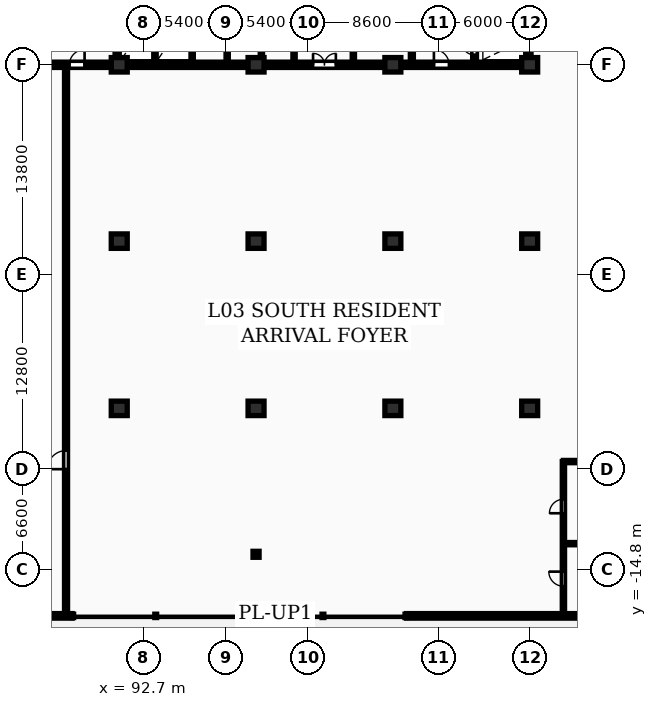
"""IFC4 building model, lengths in metres.
Left out: names, types, materials, properties, quantities, classifications, styles, units other than length and angle.
Written with IfcOpenShell. Run it as: python <this file> out.ifc"""

import sys

from ifc_helpers import new_model, si_unit, direction, frame, frame_2d, origin, origin_2d, place, context, subcontext, project, spatial, rectangle, i_section, extrude, element, fill, save


model = new_model("IFC4")
c1 = context("Model", 3, precision=1e-05, world=origin(), true_north=direction((0.0, 1.0)))
c2 = subcontext(c1, "Body", "Model", "MODEL_VIEW")
j1 = project(units=[si_unit("LENGTHUNIT", "METRE"), si_unit("PLANEANGLEUNIT", "RADIAN")], contexts=[c1])
p1 = place(None, origin())
s1 = spatial("IfcSite", under=j1, at=p1, CompositionType="ELEMENT")
p2 = place(p1, origin())
s2 = spatial("IfcBuilding", under=s1, at=p2, CompositionType="ELEMENT")
p3 = place(p2, frame((0.0, 0.0, 14.5)))
s3 = spatial("IfcBuildingStorey", under=s2, at=p3, CompositionType="ELEMENT", Elevation=14.5)
for number, where, z_axis, x_axis in (
    (1, (91.1, -4.2, 0.0), (0.0, 0.0, 1.0), (1.0, 0.0, 0.0)),
    (2, (91.1, 6.8, 0.0), (0.0, 0.0, 1.0), (1.0, 0.0, 0.0)),
    (3, (91.1, 18.4, 0.0), (0.0, 0.0, 1.0), (1.0, 0.0, 0.0)),
    (4, (100.1, -4.2, 0.0), (0.0, 0.0, 1.0), (1.0, 0.0, 0.0)),
    (5, (100.1, 6.8, 0.0), (0.0, 0.0, 1.0), (1.0, 0.0, 0.0)),
    (6, (100.1, 18.4, 0.0), (0.0, 0.0, 1.0), (1.0, 0.0, 0.0)),
    (7, (109.1, -4.2, 0.0), (0.0, 0.0, 1.0), (1.0, 0.0, 0.0)),
    (8, (109.1, 6.8, 0.0), (0.0, 0.0, 1.0), (1.0, 0.0, 0.0)),
    (9, (109.1, 18.4, 0.0), (0.0, 0.0, 1.0), (1.0, 0.0, 0.0)),
    (10, (118.1, -4.2, 0.0), (0.0, 0.0, 1.0), (1.0, 0.0, 0.0)),
    (11, (118.1, 6.8, 0.0), (0.0, 0.0, 1.0), (1.0, 0.0, 0.0)),
    (12, (118.1, 18.4, 0.0), (0.0, 0.0, 1.0), (1.0, 0.0, 0.0)),
):
    element("IfcColumn", number, at=place(p3, frame(where, z_axis=z_axis, x_axis=x_axis)), inside=s3, PredefinedType="COLUMN", context=c2, shape_type="SweptSolid", body=[
        extrude(rectangle(XDim=1.05, YDim=0.95, at=origin_2d()), origin(), (0.0, 0.0, 1.0), 4.5),
    ])
p4 = place(p3, frame((100.1, -13.8, 0.0), z_axis=(0.0, 0.0, 1.0), x_axis=(1.0, 0.0, 0.0)))
e13 = element("IfcColumn", 13, at=p4, inside=s3, PredefinedType="COLUMN", context=c2, shape_type="SweptSolid", body=[
    extrude(i_section(OverallWidth=0.399, OverallDepth=0.394, WebThickness=0.023, FlangeThickness=0.037, FilletRadius=0.015, at=origin_2d()), origin(), (0.0, 0.0, 1.0), 4.5),
])
p5 = place(p3, frame((51.5, -17.85, 0.0), z_axis=(0.0, 0.0, 1.0), x_axis=(1.0, 0.0, 0.0)))
e14 = element("IfcWall", 14, at=p5, inside=s3, PredefinedType="STANDARD", context=c2, shape_type="SweptSolid", body=[
    extrude(rectangle(XDim=36.5, YDim=0.3, at=frame_2d((18.25, 0.0))), origin(), (0.0, 0.0, 1.0), 4.18),
])
p6 = place(p5, frame((14.0, 0.0, 0.0)))
e15 = element("IfcOpeningElement", 15, at=p6, cuts=e14, PredefinedType="OPENING", context=c2, shape_type="SweptSolid", body=[
    extrude(rectangle(XDim=1.6, YDim=2.2, at=frame_2d((0.8, 1.1))), frame((0.0, 0.16, 0.0), z_axis=(0.0, -1.0, 0.0), x_axis=(1.0, 0.0, 0.0)), (0.0, 0.0, 1.0), 0.32),
])
p7 = place(p5, frame((24.0, 0.0, 0.9)))
e16 = element("IfcOpeningElement", 16, at=p7, cuts=e14, PredefinedType="OPENING", context=c2, shape_type="SweptSolid", body=[
    extrude(rectangle(XDim=3.0, YDim=2.6, at=frame_2d((1.5, 1.3))), frame((0.0, 0.16, 0.0), z_axis=(0.0, -1.0, 0.0), x_axis=(1.0, 0.0, 0.0)), (0.0, 0.0, 1.0), 0.32),
])
p8 = place(p3, frame((110.0, -17.85, 0.0), z_axis=(0.0, 0.0, 1.0), x_axis=(1.0, 0.0, 0.0)))
e17 = element("IfcWall", 17, at=p8, inside=s3, PredefinedType="STANDARD", context=c2, shape_type="SweptSolid", body=[
    extrude(rectangle(XDim=34.0, YDim=0.3, at=frame_2d((17.0, 0.0))), origin(), (0.0, 0.0, 1.0), 4.18),
])
p9 = place(p3, frame((118.015, 18.575, 0.0), z_axis=(0.0, 0.0, 1.0), x_axis=(0.0, 1.0, 0.0)))
e18 = element("IfcWall", 18, at=p9, inside=s3, PredefinedType="SHEAR", context=c2, shape_type="SweptSolid", body=[
    extrude(rectangle(XDim=11.65, YDim=0.35, at=frame_2d((5.825, 0.0))), origin(), (0.0, 0.0, 1.0), 4.5),
])
p10 = place(p3, frame((81.925, 18.4, 0.0), z_axis=(0.0, 0.0, 1.0), x_axis=(1.0, 0.0, 0.0)))
e19 = element("IfcWall", 19, at=p10, inside=s3, PredefinedType="SHEAR", context=c2, shape_type="SweptSolid", body=[
    extrude(rectangle(XDim=36.265, YDim=0.35, at=frame_2d((18.132, 0.0))), origin(), (0.0, 0.0, 1.0), 4.5),
])
p11 = place(p10, frame((5.895, 0.0, 0.0)))
e20 = element("IfcOpeningElement", 20, at=p11, cuts=e19, PredefinedType="OPENING", context=c2, shape_type="SweptSolid", body=[
    extrude(rectangle(XDim=1.0, YDim=2.15, at=frame_2d((0.5, 1.075))), frame((0.0, 0.185, 0.0), z_axis=(0.0, -1.0, 0.0), x_axis=(1.0, 0.0, 0.0)), (0.0, 0.0, 1.0), 0.37),
])
p12 = place(p10, frame((21.925, 0.0, 0.0)))
e21 = element("IfcOpeningElement", 21, at=p12, cuts=e19, PredefinedType="OPENING", context=c2, shape_type="SweptSolid", body=[
    extrude(rectangle(XDim=1.5, YDim=2.2, at=frame_2d((0.75, 1.1))), frame((0.0, 0.185, 0.0), z_axis=(0.0, -1.0, 0.0), x_axis=(1.0, 0.0, 0.0)), (0.0, 0.0, 1.0), 0.37),
])
p13 = place(p10, frame((29.875, 0.0, 0.0)))
e22 = element("IfcOpeningElement", 22, at=p13, cuts=e19, PredefinedType="OPENING", context=c2, shape_type="SweptSolid", body=[
    extrude(rectangle(XDim=1.0, YDim=2.15, at=frame_2d((0.5, 1.075))), frame((0.0, 0.185, 0.0), z_axis=(0.0, -1.0, 0.0), x_axis=(1.0, 0.0, 0.0)), (0.0, 0.0, 1.0), 0.37),
])
p14 = place(p3, frame((90.95, 18.6, 0.0), z_axis=(0.0, 0.0, 1.0), x_axis=(0.0, 1.0, 0.0)))
e23 = element("IfcWall", 23, at=p14, inside=s3, PredefinedType="SHEAR", context=c2, shape_type="SweptSolid", body=[
    extrude(rectangle(XDim=11.6, YDim=0.25, at=frame_2d((5.8, 0.0))), origin(), (0.0, 0.0, 1.0), 4.5),
])
p15 = place(p14, frame((4.6, 0.0, 0.0)))
e24 = element("IfcOpeningElement", 24, at=p15, cuts=e23, PredefinedType="OPENING", context=c2, shape_type="SweptSolid", body=[
    extrude(rectangle(XDim=1.1, YDim=2.1, at=frame_2d((0.55, 1.05))), frame((0.0, 0.135, 0.0), z_axis=(0.0, -1.0, 0.0), x_axis=(1.0, 0.0, 0.0)), (0.0, 0.0, 1.0), 0.27),
])
for number, where, z_axis, x_axis in (
    (25, (93.45, 18.6, 0.0), (0.0, 0.0, 1.0), (0.0, 1.0, 0.0)),
    (26, (95.9, 18.6, 0.0), (0.0, 0.0, 1.0), (0.0, 1.0, 0.0)),
    (27, (98.2, 18.6, 0.0), (0.0, 0.0, 1.0), (0.0, 1.0, 0.0)),
):
    element("IfcWall", number, at=place(p3, frame(where, z_axis=z_axis, x_axis=x_axis)), inside=s3, PredefinedType="PARTITIONING", context=c2, shape_type="SweptSolid", body=[
        extrude(rectangle(XDim=3.6, YDim=0.15, at=frame_2d((1.8, 0.0))), origin(), (0.0, 0.0, 1.0), 4.18),
    ])
p16 = place(p3, frame((100.45, 18.6, 0.0), z_axis=(0.0, 0.0, 1.0), x_axis=(0.0, 1.0, 0.0)))
e28 = element("IfcWall", 28, at=p16, inside=s3, PredefinedType="PARTITIONING", context=c2, shape_type="SweptSolid", body=[
    extrude(rectangle(XDim=3.6, YDim=0.15, at=frame_2d((1.8, 0.0))), origin(), (0.0, 0.0, 1.0), 3.43),
])
for number, where, z_axis, x_axis in (
    (29, (102.6, 18.6, 0.0), (0.0, 0.0, 1.0), (0.0, 1.0, 0.0)),
    (30, (106.5, 18.6, 0.0), (0.0, 0.0, 1.0), (0.0, 1.0, 0.0)),
):
    element("IfcWall", number, at=place(p3, frame(where, z_axis=z_axis, x_axis=x_axis)), inside=s3, PredefinedType="PARTITIONING", context=c2, shape_type="SweptSolid", body=[
        extrude(rectangle(XDim=3.6, YDim=0.15, at=frame_2d((1.8, 0.0))), origin(), (0.0, 0.0, 1.0), 4.18),
    ])
p17 = place(p3, frame((110.35, 18.6, 0.0), z_axis=(0.0, 0.0, 1.0), x_axis=(0.0, 1.0, 0.0)))
e31 = element("IfcWall", 31, at=p17, inside=s3, PredefinedType="PARTITIONING", context=c2, shape_type="SweptSolid", body=[
    extrude(rectangle(XDim=11.6, YDim=0.2, at=frame_2d((5.8, 0.0))), origin(), (0.0, 0.0, 1.0), 4.18),
])
p18 = place(p17, frame((5.2, 0.0, 0.0)))
e32 = element("IfcOpeningElement", 32, at=p18, cuts=e31, PredefinedType="OPENING", context=c2, shape_type="SweptSolid", body=[
    extrude(rectangle(XDim=1.1, YDim=2.15, at=frame_2d((0.55, 1.075))), frame((0.0, 0.11, 0.0), z_axis=(0.0, -1.0, 0.0), x_axis=(1.0, 0.0, 0.0)), (0.0, 0.0, 1.0), 0.22),
])
p19 = place(p3, frame((114.475, 18.6, 0.0), z_axis=(0.0, 0.0, 1.0), x_axis=(0.0, 1.0, 0.0)))
e33 = element("IfcWall", 33, at=p19, inside=s3, PredefinedType="SHEAR", context=c2, shape_type="SweptSolid", body=[
    extrude(rectangle(XDim=11.6, YDim=0.25, at=frame_2d((5.8, 0.0))), origin(), (0.0, 0.0, 1.0), 4.5),
])
p20 = place(p19, frame((0.45, 0.0, 0.0)))
e34 = element("IfcOpeningElement", 34, at=p20, cuts=e33, PredefinedType="OPENING", context=c2, shape_type="SweptSolid", body=[
    extrude(rectangle(XDim=0.85, YDim=2.05, at=frame_2d((0.425, 1.025))), frame((0.0, 0.135, 0.0), z_axis=(0.0, -1.0, 0.0), x_axis=(1.0, 0.0, 0.0)), (0.0, 0.0, 1.0), 0.27),
])
p21 = place(p19, frame((2.05, 0.0, 0.0)))
e35 = element("IfcOpeningElement", 35, at=p21, cuts=e33, PredefinedType="OPENING", context=c2, shape_type="SweptSolid", body=[
    extrude(rectangle(XDim=1.1, YDim=2.1, at=frame_2d((0.55, 1.05))), frame((0.0, 0.135, 0.0), z_axis=(0.0, -1.0, 0.0), x_axis=(1.0, 0.0, 0.0)), (0.0, 0.0, 1.0), 0.27),
])
p22 = place(p19, frame((9.95, 0.0, 0.0)))
e36 = element("IfcOpeningElement", 36, at=p22, cuts=e33, PredefinedType="OPENING", context=c2, shape_type="SweptSolid", body=[
    extrude(rectangle(XDim=0.85, YDim=2.05, at=frame_2d((0.425, 1.025))), frame((0.0, 0.135, 0.0), z_axis=(0.0, -1.0, 0.0), x_axis=(1.0, 0.0, 0.0)), (0.0, 0.0, 1.0), 0.27),
])
p23 = place(p3, frame((87.6, -17.7, 0.0), z_axis=(0.0, 0.0, 1.0), x_axis=(0.0, 1.0, 0.0)))
e37 = element("IfcWall", 37, at=p23, inside=s3, PredefinedType="PARTITIONING", context=c2, shape_type="SweptSolid", body=[
    extrude(rectangle(XDim=35.95, YDim=0.2, at=frame_2d((17.975, 0.0))), origin(), (0.0, 0.0, 1.0), 4.18),
])
p24 = place(p23, frame((9.5, 0.0, 0.0)))
e38 = element("IfcOpeningElement", 38, at=p24, cuts=e37, PredefinedType="OPENING", context=c2, shape_type="SweptSolid", body=[
    extrude(rectangle(XDim=1.22, YDim=2.18, at=frame_2d((0.61, 1.09))), frame((0.0, 0.11, 0.0), z_axis=(0.0, -1.0, 0.0), x_axis=(1.0, 0.0, 0.0)), (0.0, 0.0, 1.0), 0.22),
])
p25 = place(p3, frame((120.32, -17.7, 0.0), z_axis=(0.0, 0.0, 1.0), x_axis=(0.0, 1.0, 0.0)))
e39 = element("IfcWall", 39, at=p25, inside=s3, PredefinedType="PARTITIONING", context=c2, shape_type="SweptSolid", body=[
    extrude(rectangle(XDim=10.0, YDim=0.15, at=frame_2d((5.0, 0.0))), origin(), (0.0, 0.0, 1.0), 4.18),
])
p26 = place(p25, frame((1.8, 0.0, 0.0)))
e40 = element("IfcOpeningElement", 40, at=p26, cuts=e39, PredefinedType="OPENING", context=c2, shape_type="SweptSolid", body=[
    extrude(rectangle(XDim=0.96, YDim=2.1, at=frame_2d((0.48, 1.05))), frame((0.0, 0.085, 0.0), z_axis=(0.0, -1.0, 0.0), x_axis=(1.0, 0.0, 0.0)), (0.0, 0.0, 1.0), 0.17),
])
p27 = place(p25, frame((6.6, 0.0, 0.0)))
e41 = element("IfcOpeningElement", 41, at=p27, cuts=e39, PredefinedType="OPENING", context=c2, shape_type="SweptSolid", body=[
    extrude(rectangle(XDim=0.92, YDim=2.08, at=frame_2d((0.46, 1.04))), frame((0.0, 0.085, 0.0), z_axis=(0.0, -1.0, 0.0), x_axis=(1.0, 0.0, 0.0)), (0.0, 0.0, 1.0), 0.17),
])
for number, where, z_axis, x_axis in (
    (42, (120.32, -13.1, 0.0), (0.0, 0.0, 1.0), (1.0, 0.0, 0.0)),
    (43, (120.32, -7.7, 0.0), (0.0, 0.0, 1.0), (1.0, 0.0, 0.0)),
):
    element("IfcWall", number, at=place(p3, frame(where, z_axis=z_axis, x_axis=x_axis)), inside=s3, PredefinedType="PARTITIONING", context=c2, shape_type="SweptSolid", body=[
        extrude(rectangle(XDim=5.18, YDim=0.15, at=frame_2d((2.59, 0.0))), origin(), (0.0, 0.0, 1.0), 4.18),
    ])
p28 = place(p11, origin())
e44 = element("IfcDoor", 44, at=p28, inside=s3, OperationType="SINGLE_SWING_RIGHT", PredefinedType="DOOR", context=c2, shape_type="SweptSolid", body=[
    extrude(rectangle(XDim=1.0, YDim=2.15, at=frame_2d((0.5, 1.075))), frame((0.0, 0.025, 0.0), z_axis=(0.0, -1.0, 0.0), x_axis=(1.0, 0.0, 0.0)), (0.0, 0.0, 1.0), 0.05),
])
fill(e20, e44)
p29 = place(p12, origin())
e45 = element("IfcDoor", 45, at=p29, inside=s3, OperationType="DOUBLE_DOOR_SINGLE_SWING", PredefinedType="DOOR", context=c2, shape_type="SweptSolid", body=[
    extrude(rectangle(XDim=1.5, YDim=2.2, at=frame_2d((0.75, 1.1))), frame((0.0, 0.025, 0.0), z_axis=(0.0, -1.0, 0.0), x_axis=(1.0, 0.0, 0.0)), (0.0, 0.0, 1.0), 0.05),
])
fill(e21, e45)
p30 = place(p13, origin())
e46 = element("IfcDoor", 46, at=p30, inside=s3, OperationType="SINGLE_SWING_LEFT", PredefinedType="DOOR", context=c2, shape_type="SweptSolid", body=[
    extrude(rectangle(XDim=1.0, YDim=2.15, at=frame_2d((0.5, 1.075))), frame((0.0, 0.025, 0.0), z_axis=(0.0, -1.0, 0.0), x_axis=(1.0, 0.0, 0.0)), (0.0, 0.0, 1.0), 0.05),
])
fill(e22, e46)
p31 = place(p20, origin())
e47 = element("IfcDoor", 47, at=p31, inside=s3, OperationType="SINGLE_SWING_RIGHT", PredefinedType="DOOR", context=c2, shape_type="SweptSolid", body=[
    extrude(rectangle(XDim=0.85, YDim=2.05, at=frame_2d((0.425, 1.025))), frame((0.0, 0.025, 0.0), z_axis=(0.0, -1.0, 0.0), x_axis=(1.0, 0.0, 0.0)), (0.0, 0.0, 1.0), 0.05),
])
fill(e34, e47)
p32 = place(p24, origin())
e48 = element("IfcDoor", 48, at=p32, inside=s3, OperationType="SINGLE_SWING_LEFT", PredefinedType="DOOR", context=c2, shape_type="SweptSolid", body=[
    extrude(rectangle(XDim=1.22, YDim=2.18, at=frame_2d((0.61, 1.09))), frame((0.0, 0.025, 0.0), z_axis=(0.0, -1.0, 0.0), x_axis=(1.0, 0.0, 0.0)), (0.0, 0.0, 1.0), 0.05),
])
fill(e38, e48)
p33 = place(p26, origin())
e49 = element("IfcDoor", 49, at=p33, inside=s3, OperationType="SINGLE_SWING_RIGHT", PredefinedType="DOOR", context=c2, shape_type="SweptSolid", body=[
    extrude(rectangle(XDim=0.96, YDim=2.1, at=frame_2d((0.48, 1.05))), frame((0.0, 0.025, 0.0), z_axis=(0.0, -1.0, 0.0), x_axis=(1.0, 0.0, 0.0)), (0.0, 0.0, 1.0), 0.05),
])
fill(e40, e49)
p34 = place(p27, origin())
e50 = element("IfcDoor", 50, at=p34, inside=s3, OperationType="SINGLE_SWING_LEFT", PredefinedType="DOOR", context=c2, shape_type="SweptSolid", body=[
    extrude(rectangle(XDim=0.92, YDim=2.08, at=frame_2d((0.46, 1.04))), frame((0.0, 0.025, 0.0), z_axis=(0.0, -1.0, 0.0), x_axis=(1.0, 0.0, 0.0)), (0.0, 0.0, 1.0), 0.05),
])
fill(e41, e50)
save(model, sys.argv[1])
